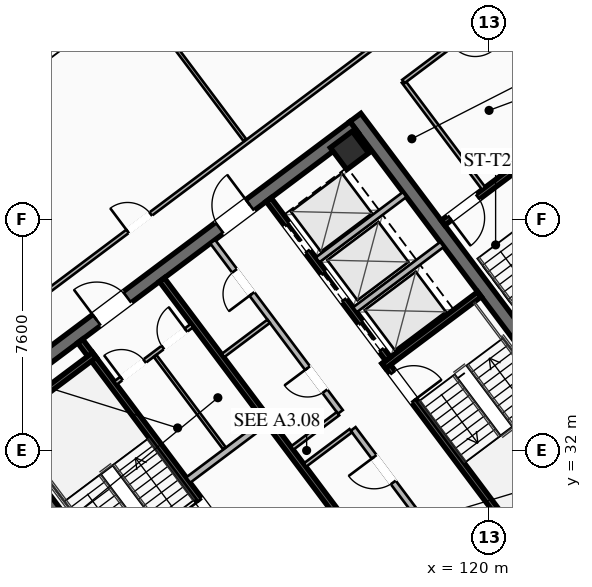
"""IFC4 building model, lengths in metres.
Left out: names, types, materials, properties, quantities, classifications, styles, units other than length and angle.
Written with IfcOpenShell. Run it as: python <this file> out.ifc"""

import sys

from ifc_helpers import new_model, si_unit, direction, frame, frame_2d, origin, origin_2d, place, context, subcontext, project, spatial, rectangle, hollow_rectangle, extrude, element, fill, save


model = new_model("IFC4")
c1 = context("Model", 3, precision=1e-05, world=origin(), true_north=direction((0.0, 1.0)))
c2 = subcontext(c1, "Body", "Model", "MODEL_VIEW")
j1 = project(units=[si_unit("LENGTHUNIT", "METRE"), si_unit("PLANEANGLEUNIT", "RADIAN")], contexts=[c1])
p1 = place(None, origin())
s1 = spatial("IfcSite", under=j1, at=p1, CompositionType="ELEMENT")
p2 = place(p1, origin())
s2 = spatial("IfcBuilding", under=s1, at=p2, CompositionType="ELEMENT")
p3 = place(p2, frame((0.0, 0.0, 225.5)))
s3 = spatial("IfcBuildingStorey", under=s2, at=p3, CompositionType="ELEMENT", Elevation=225.5)
for number, where, z_axis, x_axis in (
    (1, (112.396, 21.047, 0.0), (0.0, 0.0, 1.0), (-0.6, 0.8, 0.0)),
    (2, (115.604, 42.953, 0.0), (0.0, 0.0, 1.0), (0.6, -0.8, 0.0)),
):
    element("IfcWall", number, at=place(p3, frame(where, z_axis=z_axis, x_axis=x_axis)), inside=s3, PredefinedType="SHEAR", context=c2, shape_type="SweptSolid", body=[
        extrude(rectangle(XDim=15.6, YDim=0.45, at=frame_2d((7.8, 0.0))), origin(), (0.0, 0.0, 1.0), 3.55),
    ])
p4 = place(p3, frame((124.649, 30.518, 0.0), z_axis=(0.0, 0.0, 1.0), x_axis=(-0.8, -0.6, 0.0)))
e3 = element("IfcWall", 3, at=p4, inside=s3, PredefinedType="SHEAR", context=c2, shape_type="SweptSolid", body=[
    extrude(rectangle(XDim=15.26, YDim=0.45, at=frame_2d((7.63, 0.0))), origin(), (0.0, 0.0, 1.0), 3.55),
])
p5 = place(p4, frame((9.33, 0.0, 0.0)))
e4 = element("IfcOpeningElement", 4, at=p5, cuts=e3, PredefinedType="OPENING", context=c2, shape_type="SweptSolid", body=[
    extrude(rectangle(XDim=1.25, YDim=2.25, at=frame_2d((0.625, 1.125))), frame((0.0, 0.235, 0.0), z_axis=(0.0, -1.0, 0.0), x_axis=(1.0, 0.0, 0.0)), (0.0, 0.0, 1.0), 0.47),
])
p6 = place(p4, frame((4.28, 0.0, 0.0)))
e5 = element("IfcOpeningElement", 5, at=p6, cuts=e3, PredefinedType="OPENING", context=c2, shape_type="SweptSolid", body=[
    extrude(rectangle(XDim=1.25, YDim=2.25, at=frame_2d((0.625, 1.125))), frame((0.0, 0.235, 0.0), z_axis=(0.0, -1.0, 0.0), x_axis=(1.0, 0.0, 0.0)), (0.0, 0.0, 1.0), 0.47),
])
p7 = place(p3, frame((103.351, 33.482, 0.0), z_axis=(0.0, 0.0, 1.0), x_axis=(0.8, 0.6, 0.0)))
e6 = element("IfcWall", 6, at=p7, inside=s3, PredefinedType="SHEAR", context=c2, shape_type="SweptSolid", body=[
    extrude(rectangle(XDim=15.26, YDim=0.45, at=frame_2d((7.63, 0.0))), origin(), (0.0, 0.0, 1.0), 3.55),
])
p8 = place(p7, frame((4.68, 0.0, 0.0)))
e7 = element("IfcOpeningElement", 7, at=p8, cuts=e6, PredefinedType="OPENING", context=c2, shape_type="SweptSolid", body=[
    extrude(rectangle(XDim=1.25, YDim=2.25, at=frame_2d((0.625, 1.125))), frame((0.0, 0.235, 0.0), z_axis=(0.0, -1.0, 0.0), x_axis=(1.0, 0.0, 0.0)), (0.0, 0.0, 1.0), 0.47),
])
p9 = place(p7, frame((9.73, 0.0, 0.0)))
e8 = element("IfcOpeningElement", 8, at=p9, cuts=e6, PredefinedType="OPENING", context=c2, shape_type="SweptSolid", body=[
    extrude(rectangle(XDim=1.25, YDim=2.25, at=frame_2d((0.625, 1.125))), frame((0.0, 0.235, 0.0), z_axis=(0.0, -1.0, 0.0), x_axis=(1.0, 0.0, 0.0)), (0.0, 0.0, 1.0), 0.47),
])
p10 = place(p3, frame((115.41, 41.87, 0.0), z_axis=(0.0, 0.0, 1.0), x_axis=(0.799999996291, 0.600000004945, 0.0)))
e9 = element("IfcColumn", 9, at=p10, inside=s3, PredefinedType="COLUMN", context=c2, shape_type="SweptSolid", body=[
    extrude(hollow_rectangle(XDim=0.9, YDim=0.9, WallThickness=0.04, at=origin_2d()), origin(), (0.0, 0.0, 1.0), 3.37),
])
p11 = place(p3, frame((111.44, 29.08, 0.0), z_axis=(0.0, 0.0, 1.0), x_axis=(-0.59999041401, 0.800007189403, 0.0)))
e10 = element("IfcWall", 10, at=p11, inside=s3, PredefinedType="SHEAR", context=c2, shape_type="SweptSolid", body=[
    extrude(rectangle(XDim=8.15, YDim=0.2, at=frame_2d((4.075, 0.0))), origin(), (0.0, 0.0, 1.0), 3.37),
])
p12 = place(p11, frame((0.45, 0.0, 0.0)))
e11 = element("IfcOpeningElement", 11, at=p12, cuts=e10, PredefinedType="OPENING", context=c2, shape_type="SweptSolid", body=[
    extrude(rectangle(XDim=1.15, YDim=2.2, at=frame_2d((0.575, 1.1))), frame((0.0, 0.11, 0.0), z_axis=(0.0, -1.0, 0.0), x_axis=(1.0, 0.0, 0.0)), (0.0, 0.0, 1.0), 0.22),
])
p13 = place(p3, frame((103.876, 32.782, 0.0), z_axis=(0.0, 0.0, 1.0), x_axis=(0.800014909178, 0.599980120581, 0.0)))
e12 = element("IfcWall", 12, at=p13, inside=s3, PredefinedType="SHEAR", context=c2, shape_type="SweptSolid", body=[
    extrude(rectangle(XDim=3.93, YDim=0.2, at=frame_2d((1.965, 0.0))), origin(), (0.0, 0.0, 1.0), 3.37),
])
p14 = place(p3, frame((116.56, 34.92, 0.0), z_axis=(0.0, 0.0, 1.0), x_axis=(0.59999041401, -0.800007189403, 0.0)))
e13 = element("IfcWall", 13, at=p14, inside=s3, PredefinedType="SHEAR", context=c2, shape_type="SweptSolid", body=[
    extrude(rectangle(XDim=8.15, YDim=0.2, at=frame_2d((4.075, 0.0))), origin(), (0.0, 0.0, 1.0), 3.37),
])
p15 = place(p14, frame((0.45, 0.0, 0.0)))
e14 = element("IfcOpeningElement", 14, at=p15, cuts=e13, PredefinedType="OPENING", context=c2, shape_type="SweptSolid", body=[
    extrude(rectangle(XDim=1.15, YDim=2.2, at=frame_2d((0.575, 1.1))), frame((0.0, 0.11, 0.0), z_axis=(0.0, -1.0, 0.0), x_axis=(1.0, 0.0, 0.0)), (0.0, 0.0, 1.0), 0.22),
])
p16 = place(p3, frame((116.54, 34.78, 0.0), z_axis=(0.0, 0.0, 1.0), x_axis=(0.800014909178, 0.599980120581, 0.0)))
e15 = element("IfcWall", 15, at=p16, inside=s3, PredefinedType="SHEAR", context=c2, shape_type="SweptSolid", body=[
    extrude(rectangle(XDim=3.93, YDim=0.2, at=frame_2d((1.965, 0.0))), origin(), (0.0, 0.0, 1.0), 3.37),
])
p17 = place(p3, frame((118.058, 25.856, 0.0), z_axis=(0.0, 0.0, 1.0), x_axis=(-0.600002657301, 0.799998007018, 0.0)))
e16 = element("IfcWall", 16, at=p17, inside=s3, PredefinedType="SHEAR", context=c2, shape_type="SweptSolid", body=[
    extrude(rectangle(XDim=14.7, YDim=0.2, at=frame_2d((7.35, 0.0))), origin(), (0.0, 0.0, 1.0), 3.37),
])
p18 = place(p3, frame((110.104, 31.028, 0.0), z_axis=(0.0, 0.0, 1.0), x_axis=(0.800018601094, 0.59997519774, 0.0)))
e17 = element("IfcWall", 17, at=p18, inside=s3, PredefinedType="SOLIDWALL", context=c2, shape_type="SweptSolid", body=[
    extrude(rectangle(XDim=3.15, YDim=0.22, at=frame_2d((1.575, 0.0))), origin(), (0.0, 0.0, 1.0), 2.723),
])
p19 = place(p3, frame((112.75, 40.25, 0.0), z_axis=(0.0, 0.0, 1.0), x_axis=(0.599994036198, -0.800004472816, 0.0)))
e18 = element("IfcWall", 18, at=p19, inside=s3, PredefinedType="SHEAR", context=c2, shape_type="SweptSolid", body=[
    extrude(rectangle(XDim=6.55, YDim=0.2, at=frame_2d((3.275, 0.0))), origin(), (0.0, 0.0, 1.0), 3.37),
])
p20 = place(p19, frame((5.075, 0.0, 0.0)))
e19 = element("IfcOpeningElement", 19, at=p20, cuts=e18, PredefinedType="OPENING", context=c2, shape_type="SweptSolid", body=[
    extrude(rectangle(XDim=1.1, YDim=2.2, at=frame_2d((0.55, 1.1))), frame((0.0, 0.11, 0.0), z_axis=(0.0, -1.0, 0.0), x_axis=(1.0, 0.0, 0.0)), (0.0, 0.0, 1.0), 0.22),
])
p21 = place(p19, frame((3.025, 0.0, 0.0)))
e20 = element("IfcOpeningElement", 20, at=p21, cuts=e18, PredefinedType="OPENING", context=c2, shape_type="SweptSolid", body=[
    extrude(rectangle(XDim=1.1, YDim=2.2, at=frame_2d((0.55, 1.1))), frame((0.0, 0.11, 0.0), z_axis=(0.0, -1.0, 0.0), x_axis=(1.0, 0.0, 0.0)), (0.0, 0.0, 1.0), 0.22),
])
p22 = place(p19, frame((1.025, 0.0, 0.0)))
e21 = element("IfcOpeningElement", 21, at=p22, cuts=e18, PredefinedType="OPENING", context=c2, shape_type="SweptSolid", body=[
    extrude(rectangle(XDim=1.1, YDim=2.2, at=frame_2d((0.55, 1.1))), frame((0.0, 0.11, 0.0), z_axis=(0.0, -1.0, 0.0), x_axis=(1.0, 0.0, 0.0)), (0.0, 0.0, 1.0), 0.22),
])
for number, where, z_axis, x_axis in (
    (22, (115.59, 36.63, 0.0), (0.0, 0.0, 1.0), (0.8, 0.6, 0.0)),
    (23, (114.36, 38.27, 0.0), (0.0, 0.0, 1.0), (0.8, 0.6, 0.0)),
):
    element("IfcWall", number, at=place(p3, frame(where, z_axis=z_axis, x_axis=x_axis)), inside=s3, PredefinedType="SOLIDWALL", context=c2, shape_type="SweptSolid", body=[
        extrude(rectangle(XDim=3.58, YDim=0.2, at=frame_2d((1.79, 0.0))), origin(), (0.0, 0.0, 1.0), 3.37),
    ])
p23 = place(p3, frame((107.71, 34.22, 0.0), z_axis=(0.0, 0.0, 1.0), x_axis=(0.799981399002, 0.60002480053, 0.0)))
e24 = element("IfcWall", 24, at=p23, inside=s3, PredefinedType="PARTITIONING", context=c2, shape_type="SweptSolid", body=[
    extrude(rectangle(XDim=3.15, YDim=0.135, at=frame_2d((1.575, 0.0))), origin(), (0.0, 0.0, 1.0), 2.723),
])
p24 = place(p23, frame((0.25, 0.0, 0.0)))
e25 = element("IfcOpeningElement", 25, at=p24, cuts=e24, PredefinedType="OPENING", context=c2, shape_type="SweptSolid", body=[
    extrude(rectangle(XDim=0.95, YDim=2.05, at=frame_2d((0.475, 1.025))), frame((0.0, 0.077, 0.0), z_axis=(0.0, -1.0, 0.0), x_axis=(1.0, 0.0, 0.0)), (0.0, 0.0, 1.0), 0.155),
])
p25 = place(p23, frame((1.95, 0.0, 0.0)))
e26 = element("IfcOpeningElement", 26, at=p25, cuts=e24, PredefinedType="OPENING", context=c2, shape_type="SweptSolid", body=[
    extrude(rectangle(XDim=0.95, YDim=2.05, at=frame_2d((0.475, 1.025))), frame((0.0, 0.077, 0.0), z_axis=(0.0, -1.0, 0.0), x_axis=(1.0, 0.0, 0.0)), (0.0, 0.0, 1.0), 0.155),
])
p26 = place(p3, frame((111.296, 32.072, 0.0), z_axis=(0.0, 0.0, 1.0), x_axis=(-0.59995887973, 0.800030838552, 0.0)))
e27 = element("IfcWall", 27, at=p26, inside=s3, PredefinedType="PARTITIONING", context=c2, shape_type="SweptSolid", body=[
    extrude(rectangle(XDim=3.8, YDim=0.11, at=frame_2d((1.9, 0.0))), origin(), (0.0, 0.0, 1.0), 2.723),
])
p27 = place(p3, frame((119.73, 27.11, 0.0), z_axis=(0.0, 0.0, 1.0), x_axis=(-0.600005580459, 0.799995814625, 0.0)))
e28 = element("IfcWall", 28, at=p27, inside=s3, PredefinedType="SOLIDWALL", context=c2, shape_type="SweptSolid", body=[
    extrude(rectangle(XDim=7.0, YDim=0.2, at=frame_2d((3.5, 0.0))), origin(), (0.0, 0.0, 1.0), 2.723),
])
p28 = place(p27, frame((0.85, 0.0, 0.0)))
e29 = element("IfcOpeningElement", 29, at=p28, cuts=e28, PredefinedType="OPENING", context=c2, shape_type="SweptSolid", body=[
    extrude(rectangle(XDim=0.95, YDim=2.05, at=frame_2d((0.475, 1.025))), frame((0.0, 0.11, 0.0), z_axis=(0.0, -1.0, 0.0), x_axis=(1.0, 0.0, 0.0)), (0.0, 0.0, 1.0), 0.22),
])
p29 = place(p27, frame((4.8, 0.0, 0.0)))
e30 = element("IfcOpeningElement", 30, at=p29, cuts=e28, PredefinedType="OPENING", context=c2, shape_type="SweptSolid", body=[
    extrude(rectangle(XDim=1.05, YDim=2.2, at=frame_2d((0.525, 1.1))), frame((0.0, 0.11, 0.0), z_axis=(0.0, -1.0, 0.0), x_axis=(1.0, 0.0, 0.0)), (0.0, 0.0, 1.0), 0.22),
])
p30 = place(p3, frame((113.946, 31.522, 0.0), z_axis=(0.0, 0.0, 1.0), x_axis=(0.8, 0.6, 0.0)))
e31 = element("IfcWall", 31, at=p30, inside=s3, PredefinedType="PARTITIONING", context=c2, shape_type="SweptSolid", body=[
    extrude(rectangle(XDim=1.88, YDim=0.135, at=frame_2d((0.94, 0.0))), origin(), (0.0, 0.0, 1.0), 2.723),
])
p31 = place(p3, frame((115.11, 33.27, 0.0), z_axis=(0.0, 0.0, 1.0), x_axis=(-0.600011160345, 0.79999162962, 0.0)))
e32 = element("IfcWall", 32, at=p31, inside=s3, PredefinedType="SOLIDWALL", context=c2, shape_type="SweptSolid", body=[
    extrude(rectangle(XDim=7.0, YDim=0.2, at=frame_2d((3.5, 0.0))), origin(), (0.0, 0.0, 1.0), 2.723),
])
p32 = place(p31, frame((0.85, 0.0, 0.0)))
e33 = element("IfcOpeningElement", 33, at=p32, cuts=e32, PredefinedType="OPENING", context=c2, shape_type="SweptSolid", body=[
    extrude(rectangle(XDim=0.95, YDim=2.05, at=frame_2d((0.475, 1.025))), frame((0.0, 0.11, 0.0), z_axis=(0.0, -1.0, 0.0), x_axis=(1.0, 0.0, 0.0)), (0.0, 0.0, 1.0), 0.22),
])
p33 = place(p31, frame((4.85, 0.0, 0.0)))
e34 = element("IfcOpeningElement", 34, at=p33, cuts=e32, PredefinedType="OPENING", context=c2, shape_type="SweptSolid", body=[
    extrude(rectangle(XDim=0.95, YDim=2.05, at=frame_2d((0.475, 1.025))), frame((0.0, 0.11, 0.0), z_axis=(0.0, -1.0, 0.0), x_axis=(1.0, 0.0, 0.0)), (0.0, 0.0, 1.0), 0.22),
])
p34 = place(p3, frame((113.526, 32.082, 0.0), z_axis=(0.0, 0.0, 1.0), x_axis=(0.800046745961, 0.599937666993, 0.0)))
e35 = element("IfcWall", 35, at=p34, inside=s3, PredefinedType="PARTITIONING", context=c2, shape_type="SweptSolid", body=[
    extrude(rectangle(XDim=1.88, YDim=0.135, at=frame_2d((0.94, 0.0))), origin(), (0.0, 0.0, 1.0), 2.723),
])
p35 = place(p3, frame((111.246, 35.122, 0.0), z_axis=(0.0, 0.0, 1.0), x_axis=(0.8, 0.6, 0.0)))
e36 = element("IfcWall", 36, at=p35, inside=s3, PredefinedType="PARTITIONING", context=c2, shape_type="SweptSolid", body=[
    extrude(rectangle(XDim=1.88, YDim=0.135, at=frame_2d((0.94, 0.0))), origin(), (0.0, 0.0, 1.0), 2.723),
])
p36 = place(p3, frame((121.204, 41.528, 0.0), z_axis=(0.0, 0.0, 1.0), x_axis=(-0.800017232136, -0.599977023131, 0.0)))
e37 = element("IfcWall", 37, at=p36, inside=s3, PredefinedType="SHEAR", context=c2, shape_type="SweptSolid", body=[
    extrude(rectangle(XDim=3.4, YDim=0.2, at=frame_2d((1.7, 0.0))), origin(), (0.0, 0.0, 1.0), 3.37),
])
p37 = place(p36, frame((1.975, 0.0, 0.0)))
e38 = element("IfcOpeningElement", 38, at=p37, cuts=e37, PredefinedType="OPENING", context=c2, shape_type="SweptSolid", body=[
    extrude(rectangle(XDim=1.15, YDim=2.2, at=frame_2d((0.575, 1.1))), frame((0.0, 0.11, 0.0), z_axis=(0.0, -1.0, 0.0), x_axis=(1.0, 0.0, 0.0)), (0.0, 0.0, 1.0), 0.22),
])
p38 = place(p3, frame((119.824, 40.618, 0.0), z_axis=(0.0, 0.0, 1.0), x_axis=(-0.599982243973, 0.800013316712, 0.0)))
e39 = element("IfcWall", 39, at=p38, inside=s3, PredefinedType="PARTITIONING", context=c2, shape_type="SweptSolid", body=[
    extrude(rectangle(XDim=4.4, YDim=0.135, at=frame_2d((2.2, 0.0))), origin(), (0.0, 0.0, 1.0), 2.723),
])
p39 = place(p3, frame((100.756, 33.692, 0.0), z_axis=(0.0, 0.0, 1.0), x_axis=(0.799998716732, 0.60000171102, 0.0)))
e40 = element("IfcWall", 40, at=p39, inside=s3, PredefinedType="PARTITIONING", context=c2, shape_type="SweptSolid", body=[
    extrude(rectangle(XDim=22.83, YDim=0.135, at=frame_2d((11.415, 0.0))), origin(), (0.0, 0.0, 1.0), 2.723),
])
p40 = place(p39, frame((9.193, 0.0, 0.0)))
e41 = element("IfcOpeningElement", 41, at=p40, cuts=e40, PredefinedType="OPENING", context=c2, shape_type="SweptSolid", body=[
    extrude(rectangle(XDim=0.95, YDim=2.05, at=frame_2d((0.475, 1.025))), frame((0.0, 0.077, 0.0), z_axis=(0.0, -1.0, 0.0), x_axis=(1.0, 0.0, 0.0)), (0.0, 0.0, 1.0), 0.155),
])
p41 = place(p39, frame((21.58, 0.0, 0.0)))
e42 = element("IfcOpeningElement", 42, at=p41, cuts=e40, PredefinedType="OPENING", context=c2, shape_type="SweptSolid", body=[
    extrude(rectangle(XDim=0.95, YDim=2.05, at=frame_2d((0.475, 1.025))), frame((0.0, 0.077, 0.0), z_axis=(0.0, -1.0, 0.0), x_axis=(1.0, 0.0, 0.0)), (0.0, 0.0, 1.0), 0.155),
])
p42 = place(p3, frame((111.972, 42.204, 0.0), z_axis=(0.0, 0.0, 1.0), x_axis=(-0.6, 0.8, 0.0)))
e43 = element("IfcWall", 43, at=p42, inside=s3, PredefinedType="PARTITIONING", context=c2, shape_type="SweptSolid", body=[
    extrude(rectangle(XDim=6.1, YDim=0.11, at=frame_2d((3.05, 0.0))), origin(), (0.0, 0.0, 1.0), 2.723),
])
p43 = place(p3, frame((121.704, 47.528, 0.0), z_axis=(0.0, 0.0, 1.0), x_axis=(-0.799989629485, -0.600013827105, 0.0)))
e44 = element("IfcWall", 44, at=p43, inside=s3, PredefinedType="PARTITIONING", context=c2, shape_type="SweptSolid", body=[
    extrude(rectangle(XDim=5.65, YDim=0.135, at=frame_2d((2.825, 0.0))), origin(), (0.0, 0.0, 1.0), 2.723),
])
p44 = place(p43, frame((2.7, 0.0, 0.0)))
e45 = element("IfcOpeningElement", 45, at=p44, cuts=e44, PredefinedType="OPENING", context=c2, shape_type="SweptSolid", body=[
    extrude(rectangle(XDim=0.95, YDim=2.05, at=frame_2d((0.475, 1.025))), frame((0.0, 0.077, 0.0), z_axis=(0.0, -1.0, 0.0), x_axis=(1.0, 0.0, 0.0)), (0.0, 0.0, 1.0), 0.155),
])
p45 = place(p3, frame((113.23, 17.06, 0.0), z_axis=(0.0, 0.0, 1.0), x_axis=(-0.600003772342, 0.79999717073, 0.0)))
e46 = element("IfcWall", 46, at=p45, inside=s3, PredefinedType="PARTITIONING", context=c2, shape_type="SweptSolid", body=[
    extrude(rectangle(XDim=20.71, YDim=0.135, at=frame_2d((10.355, 0.0))), origin(), (0.0, 0.0, 1.0), 2.723),
])
p46 = place(p45, frame((0.3, 0.0, 0.0)))
e47 = element("IfcOpeningElement", 47, at=p46, cuts=e46, PredefinedType="OPENING", context=c2, shape_type="SweptSolid", body=[
    extrude(rectangle(XDim=0.95, YDim=2.05, at=frame_2d((0.475, 1.025))), frame((0.0, 0.077, 0.0), z_axis=(0.0, -1.0, 0.0), x_axis=(1.0, 0.0, 0.0)), (0.0, 0.0, 1.0), 0.155),
])
p47 = place(p45, frame((11.272, 0.0, 0.0)))
e48 = element("IfcOpeningElement", 48, at=p47, cuts=e46, PredefinedType="OPENING", context=c2, shape_type="SweptSolid", body=[
    extrude(rectangle(XDim=0.95, YDim=2.05, at=frame_2d((0.475, 1.025))), frame((0.0, 0.077, 0.0), z_axis=(0.0, -1.0, 0.0), x_axis=(1.0, 0.0, 0.0)), (0.0, 0.0, 1.0), 0.155),
])
p48 = place(p45, frame((19.46, 0.0, 0.0)))
e49 = element("IfcOpeningElement", 49, at=p48, cuts=e46, PredefinedType="OPENING", context=c2, shape_type="SweptSolid", body=[
    extrude(rectangle(XDim=0.95, YDim=2.05, at=frame_2d((0.475, 1.025))), frame((0.0, 0.077, 0.0), z_axis=(0.0, -1.0, 0.0), x_axis=(1.0, 0.0, 0.0)), (0.0, 0.0, 1.0), 0.155),
])
p49 = place(p8, origin())
e50 = element("IfcDoor", 50, at=p49, inside=s3, OperationType="SINGLE_SWING_LEFT", PredefinedType="DOOR", context=c2, shape_type="SweptSolid", body=[
    extrude(rectangle(XDim=1.25, YDim=2.25, at=frame_2d((0.625, 1.125))), frame((0.0, 0.025, 0.0), z_axis=(0.0, -1.0, 0.0), x_axis=(1.0, 0.0, 0.0)), (0.0, 0.0, 1.0), 0.05),
])
fill(e7, e50)
p50 = place(p9, origin())
e51 = element("IfcDoor", 51, at=p50, inside=s3, OperationType="SINGLE_SWING_RIGHT", PredefinedType="DOOR", context=c2, shape_type="SweptSolid", body=[
    extrude(rectangle(XDim=1.25, YDim=2.25, at=frame_2d((0.625, 1.125))), frame((0.0, 0.025, 0.0), z_axis=(0.0, -1.0, 0.0), x_axis=(1.0, 0.0, 0.0)), (0.0, 0.0, 1.0), 0.05),
])
fill(e8, e51)
p51 = place(p12, origin())
e52 = element("IfcDoor", 52, at=p51, inside=s3, OperationType="SINGLE_SWING_RIGHT", PredefinedType="DOOR", context=c2, shape_type="SweptSolid", body=[
    extrude(rectangle(XDim=1.15, YDim=2.2, at=frame_2d((0.575, 1.1))), frame((0.0, 0.025, 0.0), z_axis=(0.0, -1.0, 0.0), x_axis=(1.0, 0.0, 0.0)), (0.0, 0.0, 1.0), 0.05),
])
fill(e11, e52)
p52 = place(p15, origin())
e53 = element("IfcDoor", 53, at=p52, inside=s3, OperationType="SINGLE_SWING_RIGHT", PredefinedType="DOOR", context=c2, shape_type="SweptSolid", body=[
    extrude(rectangle(XDim=1.15, YDim=2.2, at=frame_2d((0.575, 1.1))), frame((0.0, 0.025, 0.0), z_axis=(0.0, -1.0, 0.0), x_axis=(1.0, 0.0, 0.0)), (0.0, 0.0, 1.0), 0.05),
])
fill(e14, e53)
p53 = place(p24, origin())
e54 = element("IfcDoor", 54, at=p53, inside=s3, OperationType="SINGLE_SWING_LEFT", PredefinedType="DOOR", context=c2, shape_type="SweptSolid", body=[
    extrude(rectangle(XDim=0.95, YDim=2.05, at=frame_2d((0.475, 1.025))), frame((0.0, 0.025, 0.0), z_axis=(0.0, -1.0, 0.0), x_axis=(1.0, 0.0, 0.0)), (0.0, 0.0, 1.0), 0.05),
])
fill(e25, e54)
p54 = place(p25, origin())
e55 = element("IfcDoor", 55, at=p54, inside=s3, OperationType="SINGLE_SWING_RIGHT", PredefinedType="DOOR", context=c2, shape_type="SweptSolid", body=[
    extrude(rectangle(XDim=0.95, YDim=2.05, at=frame_2d((0.475, 1.025))), frame((0.0, 0.025, 0.0), z_axis=(0.0, -1.0, 0.0), x_axis=(1.0, 0.0, 0.0)), (0.0, 0.0, 1.0), 0.05),
])
fill(e26, e55)
p55 = place(p29, origin())
e56 = element("IfcDoor", 56, at=p55, inside=s3, OperationType="SINGLE_SWING_RIGHT", PredefinedType="DOOR", context=c2, shape_type="SweptSolid", body=[
    extrude(rectangle(XDim=1.05, YDim=2.2, at=frame_2d((0.525, 1.1))), frame((0.0, 0.025, 0.0), z_axis=(0.0, -1.0, 0.0), x_axis=(1.0, 0.0, 0.0)), (0.0, 0.0, 1.0), 0.05),
])
fill(e30, e56)
p56 = place(p32, origin())
e57 = element("IfcDoor", 57, at=p56, inside=s3, OperationType="SINGLE_SWING_RIGHT", PredefinedType="DOOR", context=c2, shape_type="SweptSolid", body=[
    extrude(rectangle(XDim=0.95, YDim=2.05, at=frame_2d((0.475, 1.025))), frame((0.0, 0.025, 0.0), z_axis=(0.0, -1.0, 0.0), x_axis=(1.0, 0.0, 0.0)), (0.0, 0.0, 1.0), 0.05),
])
fill(e33, e57)
p57 = place(p33, origin())
e58 = element("IfcDoor", 58, at=p57, inside=s3, OperationType="SINGLE_SWING_LEFT", PredefinedType="DOOR", context=c2, shape_type="SweptSolid", body=[
    extrude(rectangle(XDim=0.95, YDim=2.05, at=frame_2d((0.475, 1.025))), frame((0.0, 0.025, 0.0), z_axis=(0.0, -1.0, 0.0), x_axis=(1.0, 0.0, 0.0)), (0.0, 0.0, 1.0), 0.05),
])
fill(e34, e58)
p58 = place(p37, origin())
e59 = element("IfcDoor", 59, at=p58, inside=s3, OperationType="SINGLE_SWING_RIGHT", PredefinedType="DOOR", context=c2, shape_type="SweptSolid", body=[
    extrude(rectangle(XDim=1.15, YDim=2.2, at=frame_2d((0.575, 1.1))), frame((0.0, 0.025, 0.0), z_axis=(0.0, -1.0, 0.0), x_axis=(1.0, 0.0, 0.0)), (0.0, 0.0, 1.0), 0.05),
])
fill(e38, e59)
p59 = place(p40, origin())
e60 = element("IfcDoor", 60, at=p59, inside=s3, OperationType="SINGLE_SWING_LEFT", PredefinedType="DOOR", context=c2, shape_type="SweptSolid", body=[
    extrude(rectangle(XDim=0.95, YDim=2.05, at=frame_2d((0.475, 1.025))), frame((0.0, 0.025, 0.0), z_axis=(0.0, -1.0, 0.0), x_axis=(1.0, 0.0, 0.0)), (0.0, 0.0, 1.0), 0.05),
])
fill(e41, e60)
p60 = place(p20, origin())
e61 = element("IfcDoor", 61, at=p60, inside=s3, OperationType="SLIDING_TO_LEFT", PredefinedType="DOOR", context=c2, shape_type="SweptSolid", body=[
    extrude(rectangle(XDim=1.1, YDim=2.2, at=frame_2d((0.55, 1.1))), frame((0.0, 0.025, 0.0), z_axis=(0.0, -1.0, 0.0), x_axis=(1.0, 0.0, 0.0)), (0.0, 0.0, 1.0), 0.05),
])
fill(e19, e61)
p61 = place(p21, origin())
e62 = element("IfcDoor", 62, at=p61, inside=s3, OperationType="SLIDING_TO_LEFT", PredefinedType="DOOR", context=c2, shape_type="SweptSolid", body=[
    extrude(rectangle(XDim=1.1, YDim=2.2, at=frame_2d((0.55, 1.1))), frame((0.0, 0.025, 0.0), z_axis=(0.0, -1.0, 0.0), x_axis=(1.0, 0.0, 0.0)), (0.0, 0.0, 1.0), 0.05),
])
fill(e20, e62)
p62 = place(p22, origin())
e63 = element("IfcDoor", 63, at=p62, inside=s3, OperationType="SLIDING_TO_LEFT", PredefinedType="DOOR", context=c2, shape_type="SweptSolid", body=[
    extrude(rectangle(XDim=1.1, YDim=2.2, at=frame_2d((0.55, 1.1))), frame((0.0, 0.025, 0.0), z_axis=(0.0, -1.0, 0.0), x_axis=(1.0, 0.0, 0.0)), (0.0, 0.0, 1.0), 0.05),
])
fill(e21, e63)
save(model, sys.argv[1])
